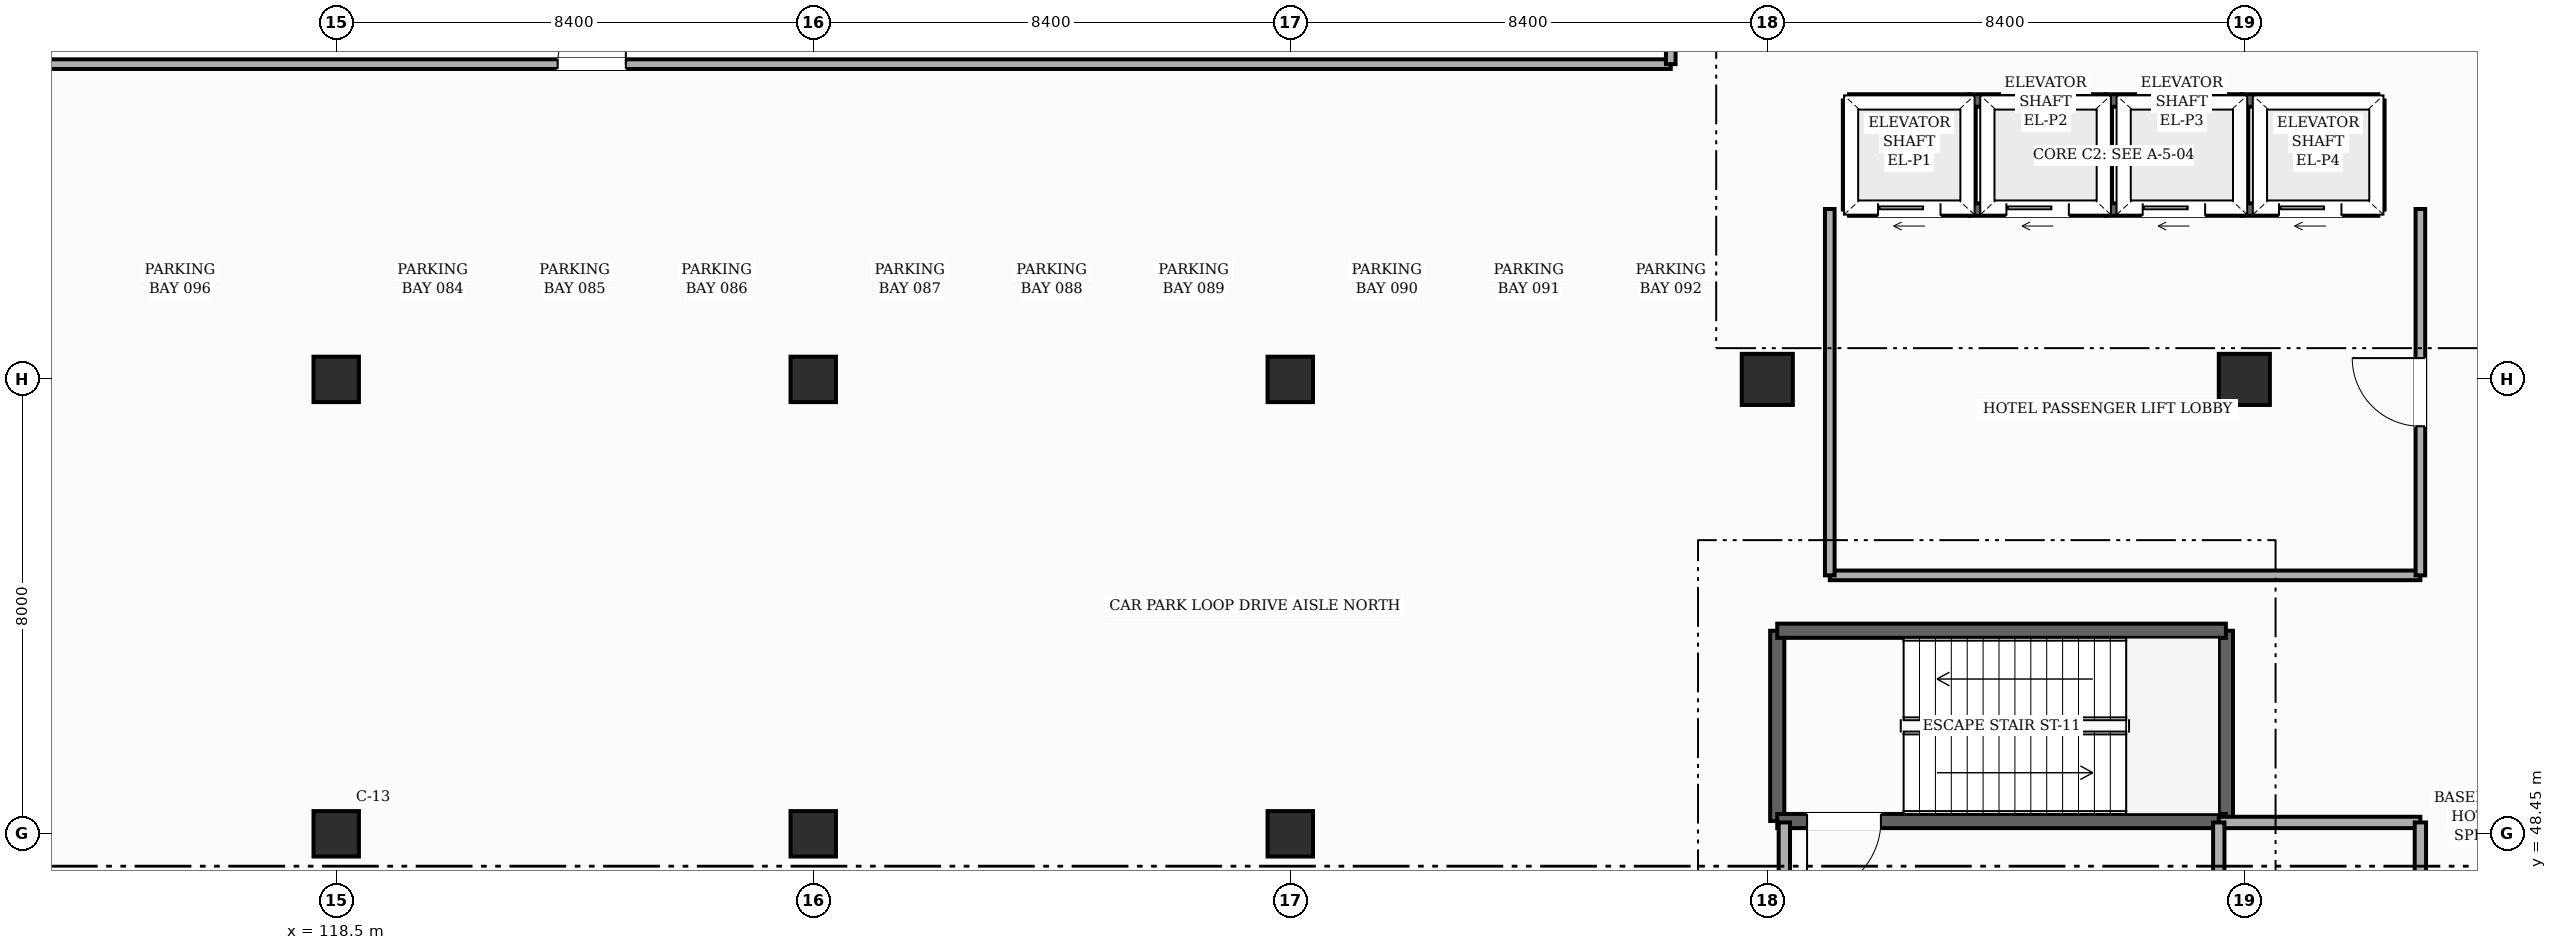
"""IFC4 building model, lengths in metres.
Left out: names, types, materials, properties, quantities, classifications, styles, units other than length and angle.
Written with IfcOpenShell. Run it as: python <this file> out.ifc"""

import sys

from ifc_helpers import new_model, si_unit, direction, frame, frame_2d, origin, origin_2d, place, context, subcontext, project, spatial, rectangle, hollow_rectangle, extrude, element, fill, save


model = new_model("IFC4")
c1 = context("Model", 3, precision=1e-05, world=origin(), true_north=direction((0.0, 1.0)))
c2 = subcontext(c1, "Body", "Model", "MODEL_VIEW")
j1 = project(units=[si_unit("LENGTHUNIT", "METRE"), si_unit("PLANEANGLEUNIT", "RADIAN")], contexts=[c1])
p1 = place(None, origin())
s1 = spatial("IfcSite", under=j1, at=p1, CompositionType="ELEMENT")
p2 = place(p1, origin())
s2 = spatial("IfcBuilding", under=s1, at=p2, CompositionType="ELEMENT")
p3 = place(p2, frame((0.0, 0.0, -5.4)))
s3 = spatial("IfcBuildingStorey", under=s2, at=p3, CompositionType="ELEMENT", Elevation=-5.4)
for number, where, z_axis, x_axis in (
    (1, (118.5, 48.45, 0.0), (0.0, 0.0, 1.0), (1.0, 0.0, 0.0)),
    (2, (118.5, 56.45, 0.0), (0.0, 0.0, 1.0), (1.0, 0.0, 0.0)),
    (3, (126.9, 48.45, 0.0), (0.0, 0.0, 1.0), (1.0, 0.0, 0.0)),
    (4, (126.9, 56.45, 0.0), (0.0, 0.0, 1.0), (1.0, 0.0, 0.0)),
    (5, (135.3, 48.45, 0.0), (0.0, 0.0, 1.0), (1.0, 0.0, 0.0)),
    (6, (135.3, 56.45, 0.0), (0.0, 0.0, 1.0), (1.0, 0.0, 0.0)),
):
    element("IfcColumn", number, at=place(p3, frame(where, z_axis=z_axis, x_axis=x_axis)), inside=s3, PredefinedType="COLUMN", context=c2, shape_type="SweptSolid", body=[
        extrude(rectangle(XDim=0.8, YDim=0.8, at=origin_2d()), origin(), (0.0, 0.0, 1.0), 5.12),
    ])
for number, where, z_axis, x_axis in (
    (7, (143.7, 56.45, 0.0), (0.0, 0.0, 1.0), (1.0, 0.0, 0.0)),
    (8, (152.1, 56.45, 0.0), (0.0, 0.0, 1.0), (1.0, 0.0, 0.0)),
):
    element("IfcColumn", number, at=place(p3, frame(where, z_axis=z_axis, x_axis=x_axis)), inside=s3, PredefinedType="COLUMN", context=c2, shape_type="SweptSolid", body=[
        extrude(hollow_rectangle(XDim=0.9, YDim=0.9, WallThickness=0.032, InnerFilletRadius=0.032, OuterFilletRadius=0.064, at=origin_2d()), origin(), (0.0, 0.0, 1.0), 5.4),
    ])
for number, where, z_axis, x_axis in (
    (9, (143.875, 48.675, 0.0), (0.0, 0.0, 1.0), (0.0, 1.0, 0.0)),
    (10, (151.775, 52.025, 0.0), (0.0, 0.0, 1.0), (0.0, -1.0, 0.0)),
):
    element("IfcWall", number, at=place(p3, frame(where, z_axis=z_axis, x_axis=x_axis)), inside=s3, PredefinedType="SHEAR", context=c2, shape_type="SweptSolid", body=[
        extrude(rectangle(XDim=3.35, YDim=0.25, at=frame_2d((1.675, 0.0))), origin(), (0.0, 0.0, 1.0), 5.12),
    ])
p4 = place(p3, frame((151.775, 48.675, 0.0), z_axis=(0.0, 0.0, 1.0), x_axis=(-1.0, 0.0, 0.0)))
e11 = element("IfcWall", 11, at=p4, inside=s3, PredefinedType="SHEAR", context=c2, shape_type="SweptSolid", body=[
    extrude(rectangle(XDim=7.9, YDim=0.25, at=frame_2d((3.95, 0.0))), origin(), (0.0, 0.0, 1.0), 5.12),
])
p5 = place(p4, frame((6.075, 0.0, 0.0)))
e12 = element("IfcOpeningElement", 12, at=p5, cuts=e11, PredefinedType="OPENING", context=c2, shape_type="SweptSolid", body=[
    extrude(rectangle(XDim=1.3, YDim=2.2, at=frame_2d((0.65, 1.1))), frame((0.0, 0.135, 0.0), z_axis=(0.0, -1.0, 0.0), x_axis=(1.0, 0.0, 0.0)), (0.0, 0.0, 1.0), 0.27),
])
p6 = place(p3, frame((143.875, 52.025, 0.0), z_axis=(0.0, 0.0, 1.0), x_axis=(1.0, 0.0, 0.0)))
e13 = element("IfcWall", 13, at=p6, inside=s3, PredefinedType="SHEAR", context=c2, shape_type="SweptSolid", body=[
    extrude(rectangle(XDim=7.9, YDim=0.25, at=frame_2d((3.95, 0.0))), origin(), (0.0, 0.0, 1.0), 5.12),
])
p7 = place(p3, frame((145.14, 61.36, 0.0), z_axis=(0.0, 0.0, 1.0), x_axis=(1.0, 0.0, 0.0)))
e14 = element("IfcWall", 14, at=p7, inside=s3, PredefinedType="SHEAR", context=c2, shape_type="SweptSolid", body=[
    extrude(rectangle(XDim=2.12, YDim=0.22, at=frame_2d((1.06, 0.0))), origin(), (0.0, 0.0, 1.0), 5.12),
])
p8 = place(p3, frame((145.14, 59.44, 0.0), z_axis=(0.0, 0.0, 1.0), x_axis=(1.0, 0.0, 0.0)))
e15 = element("IfcWall", 15, at=p8, inside=s3, PredefinedType="SHEAR", context=c2, shape_type="SweptSolid", body=[
    extrude(rectangle(XDim=2.12, YDim=0.22, at=frame_2d((1.06, 0.0))), origin(), (0.0, 0.0, 1.0), 5.12),
])
p9 = place(p8, frame((0.51, 0.0, 0.0)))
e16 = element("IfcOpeningElement", 16, at=p9, cuts=e15, PredefinedType="OPENING", context=c2, shape_type="SweptSolid", body=[
    extrude(rectangle(XDim=1.1, YDim=2.2, at=frame_2d((0.55, 1.1))), frame((0.0, 0.12, 0.0), z_axis=(0.0, -1.0, 0.0), x_axis=(1.0, 0.0, 0.0)), (0.0, 0.0, 1.0), 0.24),
])
for number, where, z_axis, x_axis in (
    (17, (147.26, 59.44, 0.0), (0.0, 0.0, 1.0), (0.0, 1.0, 0.0)),
    (18, (145.14, 59.44, 0.0), (0.0, 0.0, 1.0), (0.0, 1.0, 0.0)),
):
    element("IfcWall", number, at=place(p3, frame(where, z_axis=z_axis, x_axis=x_axis)), inside=s3, PredefinedType="SHEAR", context=c2, shape_type="SweptSolid", body=[
        extrude(rectangle(XDim=1.92, YDim=0.22, at=frame_2d((0.96, 0.0))), origin(), (0.0, 0.0, 1.0), 5.12),
    ])
p10 = place(p3, frame((147.26, 61.36, 0.0), z_axis=(0.0, 0.0, 1.0), x_axis=(1.0, 0.0, 0.0)))
e19 = element("IfcWall", 19, at=p10, inside=s3, PredefinedType="SHEAR", context=c2, shape_type="SweptSolid", body=[
    extrude(rectangle(XDim=2.4, YDim=0.22, at=frame_2d((1.2, 0.0))), origin(), (0.0, 0.0, 1.0), 5.12),
])
p11 = place(p3, frame((147.26, 59.44, 0.0), z_axis=(0.0, 0.0, 1.0), x_axis=(1.0, 0.0, 0.0)))
e20 = element("IfcWall", 20, at=p11, inside=s3, PredefinedType="SHEAR", context=c2, shape_type="SweptSolid", body=[
    extrude(rectangle(XDim=2.4, YDim=0.22, at=frame_2d((1.2, 0.0))), origin(), (0.0, 0.0, 1.0), 5.12),
])
p12 = place(p11, frame((0.65, 0.0, 0.0)))
e21 = element("IfcOpeningElement", 21, at=p12, cuts=e20, PredefinedType="OPENING", context=c2, shape_type="SweptSolid", body=[
    extrude(rectangle(XDim=1.1, YDim=2.2, at=frame_2d((0.55, 1.1))), frame((0.0, 0.12, 0.0), z_axis=(0.0, -1.0, 0.0), x_axis=(1.0, 0.0, 0.0)), (0.0, 0.0, 1.0), 0.24),
])
p13 = place(p3, frame((149.66, 59.44, 0.0), z_axis=(0.0, 0.0, 1.0), x_axis=(0.0, 1.0, 0.0)))
e22 = element("IfcWall", 22, at=p13, inside=s3, PredefinedType="SHEAR", context=c2, shape_type="SweptSolid", body=[
    extrude(rectangle(XDim=1.92, YDim=0.22, at=frame_2d((0.96, 0.0))), origin(), (0.0, 0.0, 1.0), 5.12),
])
p14 = place(p3, frame((149.66, 61.36, 0.0), z_axis=(0.0, 0.0, 1.0), x_axis=(1.0, 0.0, 0.0)))
e23 = element("IfcWall", 23, at=p14, inside=s3, PredefinedType="SHEAR", context=c2, shape_type="SweptSolid", body=[
    extrude(rectangle(XDim=2.4, YDim=0.22, at=frame_2d((1.2, 0.0))), origin(), (0.0, 0.0, 1.0), 5.12),
])
p15 = place(p3, frame((149.66, 59.44, 0.0), z_axis=(0.0, 0.0, 1.0), x_axis=(1.0, 0.0, 0.0)))
e24 = element("IfcWall", 24, at=p15, inside=s3, PredefinedType="SHEAR", context=c2, shape_type="SweptSolid", body=[
    extrude(rectangle(XDim=2.4, YDim=0.22, at=frame_2d((1.2, 0.0))), origin(), (0.0, 0.0, 1.0), 5.12),
])
p16 = place(p15, frame((0.65, 0.0, 0.0)))
e25 = element("IfcOpeningElement", 25, at=p16, cuts=e24, PredefinedType="OPENING", context=c2, shape_type="SweptSolid", body=[
    extrude(rectangle(XDim=1.1, YDim=2.2, at=frame_2d((0.55, 1.1))), frame((0.0, 0.12, 0.0), z_axis=(0.0, -1.0, 0.0), x_axis=(1.0, 0.0, 0.0)), (0.0, 0.0, 1.0), 0.24),
])
p17 = place(p3, frame((152.06, 59.44, 0.0), z_axis=(0.0, 0.0, 1.0), x_axis=(0.0, 1.0, 0.0)))
e26 = element("IfcWall", 26, at=p17, inside=s3, PredefinedType="SHEAR", context=c2, shape_type="SweptSolid", body=[
    extrude(rectangle(XDim=1.92, YDim=0.22, at=frame_2d((0.96, 0.0))), origin(), (0.0, 0.0, 1.0), 5.12),
])
p18 = place(p3, frame((152.06, 61.36, 0.0), z_axis=(0.0, 0.0, 1.0), x_axis=(1.0, 0.0, 0.0)))
e27 = element("IfcWall", 27, at=p18, inside=s3, PredefinedType="SHEAR", context=c2, shape_type="SweptSolid", body=[
    extrude(rectangle(XDim=2.4, YDim=0.22, at=frame_2d((1.2, 0.0))), origin(), (0.0, 0.0, 1.0), 5.12),
])
p19 = place(p3, frame((152.06, 59.44, 0.0), z_axis=(0.0, 0.0, 1.0), x_axis=(1.0, 0.0, 0.0)))
e28 = element("IfcWall", 28, at=p19, inside=s3, PredefinedType="SHEAR", context=c2, shape_type="SweptSolid", body=[
    extrude(rectangle(XDim=2.4, YDim=0.22, at=frame_2d((1.2, 0.0))), origin(), (0.0, 0.0, 1.0), 5.12),
])
p20 = place(p19, frame((0.65, 0.0, 0.0)))
e29 = element("IfcOpeningElement", 29, at=p20, cuts=e28, PredefinedType="OPENING", context=c2, shape_type="SweptSolid", body=[
    extrude(rectangle(XDim=1.1, YDim=2.2, at=frame_2d((0.55, 1.1))), frame((0.0, 0.12, 0.0), z_axis=(0.0, -1.0, 0.0), x_axis=(1.0, 0.0, 0.0)), (0.0, 0.0, 1.0), 0.24),
])
p21 = place(p3, frame((154.46, 59.44, 0.0), z_axis=(0.0, 0.0, 1.0), x_axis=(0.0, 1.0, 0.0)))
e30 = element("IfcWall", 30, at=p21, inside=s3, PredefinedType="SHEAR", context=c2, shape_type="SweptSolid", body=[
    extrude(rectangle(XDim=1.92, YDim=0.22, at=frame_2d((0.96, 0.0))), origin(), (0.0, 0.0, 1.0), 5.12),
])
p22 = place(p3, frame((151.65, 48.65, 0.0), z_axis=(0.0, 0.0, 1.0), x_axis=(1.0, 0.0, 0.0)))
e31 = element("IfcWall", 31, at=p22, inside=s3, PredefinedType="SOLIDWALL", context=c2, shape_type="SweptSolid", body=[
    extrude(rectangle(XDim=3.55, YDim=0.2, at=frame_2d((1.775, 0.0))), origin(), (0.0, 0.0, 1.0), 3.295),
])
p23 = place(p3, frame((144.8, 53.0, 0.0), z_axis=(0.0, 0.0, 1.0), x_axis=(1.0, 0.0, 0.0)))
e32 = element("IfcWall", 32, at=p23, inside=s3, PredefinedType="PARTITIONING", context=c2, shape_type="SweptSolid", body=[
    extrude(rectangle(XDim=10.4, YDim=0.17, at=frame_2d((5.2, 0.0))), origin(), (0.0, 0.0, 1.0), 5.105),
])
p24 = place(p3, frame((104.0, 62.0, 0.0), z_axis=(0.0, 0.0, 1.0), x_axis=(1.0, 0.0, 0.0)))
e33 = element("IfcWall", 33, at=p24, inside=s3, PredefinedType="PARTITIONING", context=c2, shape_type="SweptSolid", body=[
    extrude(rectangle(XDim=38.0, YDim=0.17, at=frame_2d((19.0, 0.0))), origin(), (0.0, 0.0, 1.0), 5.105),
])
p25 = place(p24, frame((18.4, 0.0, 0.0)))
e34 = element("IfcOpeningElement", 34, at=p25, cuts=e33, PredefinedType="OPENING", context=c2, shape_type="SweptSolid", body=[
    extrude(rectangle(XDim=1.2, YDim=2.2, at=frame_2d((0.6, 1.1))), frame((0.0, 0.095, 0.0), z_axis=(0.0, -1.0, 0.0), x_axis=(1.0, 0.0, 0.0)), (0.0, 0.0, 1.0), 0.19),
])
p26 = place(p3, frame((142.0, 62.0, 0.0), z_axis=(0.0, 0.0, 1.0), x_axis=(0.0, 1.0, 0.0)))
e35 = element("IfcWall", 35, at=p26, inside=s3, PredefinedType="PARTITIONING", context=c2, shape_type="SweptSolid", body=[
    extrude(rectangle(XDim=30.0, YDim=0.17, at=frame_2d((15.0, 0.0))), origin(), (0.0, 0.0, 1.0), 5.105),
])
p27 = place(p3, frame((144.0, 44.1, 0.0), z_axis=(0.0, 0.0, 1.0), x_axis=(0.0, 1.0, 0.0)))
e36 = element("IfcWall", 36, at=p27, inside=s3, PredefinedType="SOLIDWALL", context=c2, shape_type="SweptSolid", body=[
    extrude(rectangle(XDim=4.55, YDim=0.2, at=frame_2d((2.275, 0.0))), origin(), (0.0, 0.0, 1.0), 4.195),
])
p28 = place(p3, frame((144.8, 53.0, 0.0), z_axis=(0.0, 0.0, 1.0), x_axis=(0.0, 1.0, 0.0)))
e37 = element("IfcWall", 37, at=p28, inside=s3, PredefinedType="PARTITIONING", context=c2, shape_type="SweptSolid", body=[
    extrude(rectangle(XDim=6.45, YDim=0.17, at=frame_2d((3.225, 0.0))), origin(), (0.0, 0.0, 1.0), 5.105),
])
p29 = place(p3, frame((151.65, 44.1, 0.0), z_axis=(0.0, 0.0, 1.0), x_axis=(0.0, 1.0, 0.0)))
e38 = element("IfcWall", 38, at=p29, inside=s3, PredefinedType="SOLIDWALL", context=c2, shape_type="SweptSolid", body=[
    extrude(rectangle(XDim=4.55, YDim=0.2, at=frame_2d((2.275, 0.0))), origin(), (0.0, 0.0, 1.0), 5.105),
])
p30 = place(p29, frame((1.625, 0.0, 0.0)))
e39 = element("IfcOpeningElement", 39, at=p30, cuts=e38, PredefinedType="OPENING", context=c2, shape_type="SweptSolid", body=[
    extrude(rectangle(XDim=1.3, YDim=2.2, at=frame_2d((0.65, 1.1))), frame((0.0, 0.11, 0.0), z_axis=(0.0, -1.0, 0.0), x_axis=(1.0, 0.0, 0.0)), (0.0, 0.0, 1.0), 0.22),
])
p31 = place(p3, frame((155.2, 44.1, 0.0), z_axis=(0.0, 0.0, 1.0), x_axis=(0.0, 1.0, 0.0)))
e40 = element("IfcWall", 40, at=p31, inside=s3, PredefinedType="SOLIDWALL", context=c2, shape_type="SweptSolid", body=[
    extrude(rectangle(XDim=4.55, YDim=0.2, at=frame_2d((2.275, 0.0))), origin(), (0.0, 0.0, 1.0), 5.105),
])
p32 = place(p31, frame((1.625, 0.0, 0.0)))
e41 = element("IfcOpeningElement", 41, at=p32, cuts=e40, PredefinedType="OPENING", context=c2, shape_type="SweptSolid", body=[
    extrude(rectangle(XDim=1.3, YDim=2.2, at=frame_2d((0.65, 1.1))), frame((0.0, 0.11, 0.0), z_axis=(0.0, -1.0, 0.0), x_axis=(1.0, 0.0, 0.0)), (0.0, 0.0, 1.0), 0.22),
])
p33 = place(p3, frame((155.2, 53.0, 0.0), z_axis=(0.0, 0.0, 1.0), x_axis=(0.0, 1.0, 0.0)))
e42 = element("IfcWall", 42, at=p33, inside=s3, PredefinedType="PARTITIONING", context=c2, shape_type="SweptSolid", body=[
    extrude(rectangle(XDim=6.45, YDim=0.17, at=frame_2d((3.225, 0.0))), origin(), (0.0, 0.0, 1.0), 5.105),
])
p34 = place(p33, frame((2.625, 0.0, 0.0)))
e43 = element("IfcOpeningElement", 43, at=p34, cuts=e42, PredefinedType="OPENING", context=c2, shape_type="SweptSolid", body=[
    extrude(rectangle(XDim=1.2, YDim=2.2, at=frame_2d((0.6, 1.1))), frame((0.0, 0.095, 0.0), z_axis=(0.0, -1.0, 0.0), x_axis=(1.0, 0.0, 0.0)), (0.0, 0.0, 1.0), 0.19),
])
p35 = place(p5, origin())
e44 = element("IfcDoor", 44, at=p35, inside=s3, OperationType="SINGLE_SWING_RIGHT", PredefinedType="DOOR", context=c2, shape_type="SweptSolid", body=[
    extrude(rectangle(XDim=1.3, YDim=2.2, at=frame_2d((0.65, 1.1))), frame((0.0, 0.025, 0.0), z_axis=(0.0, -1.0, 0.0), x_axis=(1.0, 0.0, 0.0)), (0.0, 0.0, 1.0), 0.05),
])
fill(e12, e44)
p36 = place(p9, origin())
e45 = element("IfcDoor", 45, at=p36, inside=s3, OperationType="SLIDING_TO_LEFT", PredefinedType="DOOR", context=c2, shape_type="SweptSolid", body=[
    extrude(rectangle(XDim=1.1, YDim=2.2, at=frame_2d((0.55, 1.1))), frame((0.0, 0.025, 0.0), z_axis=(0.0, -1.0, 0.0), x_axis=(1.0, 0.0, 0.0)), (0.0, 0.0, 1.0), 0.05),
])
fill(e16, e45)
p37 = place(p12, origin())
e46 = element("IfcDoor", 46, at=p37, inside=s3, OperationType="SLIDING_TO_LEFT", PredefinedType="DOOR", context=c2, shape_type="SweptSolid", body=[
    extrude(rectangle(XDim=1.1, YDim=2.2, at=frame_2d((0.55, 1.1))), frame((0.0, 0.025, 0.0), z_axis=(0.0, -1.0, 0.0), x_axis=(1.0, 0.0, 0.0)), (0.0, 0.0, 1.0), 0.05),
])
fill(e21, e46)
p38 = place(p16, origin())
e47 = element("IfcDoor", 47, at=p38, inside=s3, OperationType="SLIDING_TO_LEFT", PredefinedType="DOOR", context=c2, shape_type="SweptSolid", body=[
    extrude(rectangle(XDim=1.1, YDim=2.2, at=frame_2d((0.55, 1.1))), frame((0.0, 0.025, 0.0), z_axis=(0.0, -1.0, 0.0), x_axis=(1.0, 0.0, 0.0)), (0.0, 0.0, 1.0), 0.05),
])
fill(e25, e47)
p39 = place(p20, origin())
e48 = element("IfcDoor", 48, at=p39, inside=s3, OperationType="SLIDING_TO_LEFT", PredefinedType="DOOR", context=c2, shape_type="SweptSolid", body=[
    extrude(rectangle(XDim=1.1, YDim=2.2, at=frame_2d((0.55, 1.1))), frame((0.0, 0.025, 0.0), z_axis=(0.0, -1.0, 0.0), x_axis=(1.0, 0.0, 0.0)), (0.0, 0.0, 1.0), 0.05),
])
fill(e29, e48)
p40 = place(p34, origin())
e49 = element("IfcDoor", 49, at=p40, inside=s3, OperationType="SINGLE_SWING_RIGHT", PredefinedType="DOOR", context=c2, shape_type="SweptSolid", body=[
    extrude(rectangle(XDim=1.2, YDim=2.2, at=frame_2d((0.6, 1.1))), frame((0.0, 0.025, 0.0), z_axis=(0.0, -1.0, 0.0), x_axis=(1.0, 0.0, 0.0)), (0.0, 0.0, 1.0), 0.05),
])
fill(e43, e49)
p41 = place(p25, origin())
e50 = element("IfcDoor", 50, at=p41, inside=s3, OperationType="SINGLE_SWING_RIGHT", PredefinedType="DOOR", context=c2, shape_type="SweptSolid", body=[
    extrude(rectangle(XDim=1.2, YDim=2.2, at=frame_2d((0.6, 1.1))), frame((0.0, 0.025, 0.0), z_axis=(0.0, -1.0, 0.0), x_axis=(1.0, 0.0, 0.0)), (0.0, 0.0, 1.0), 0.05),
])
fill(e34, e50)
save(model, sys.argv[1])
